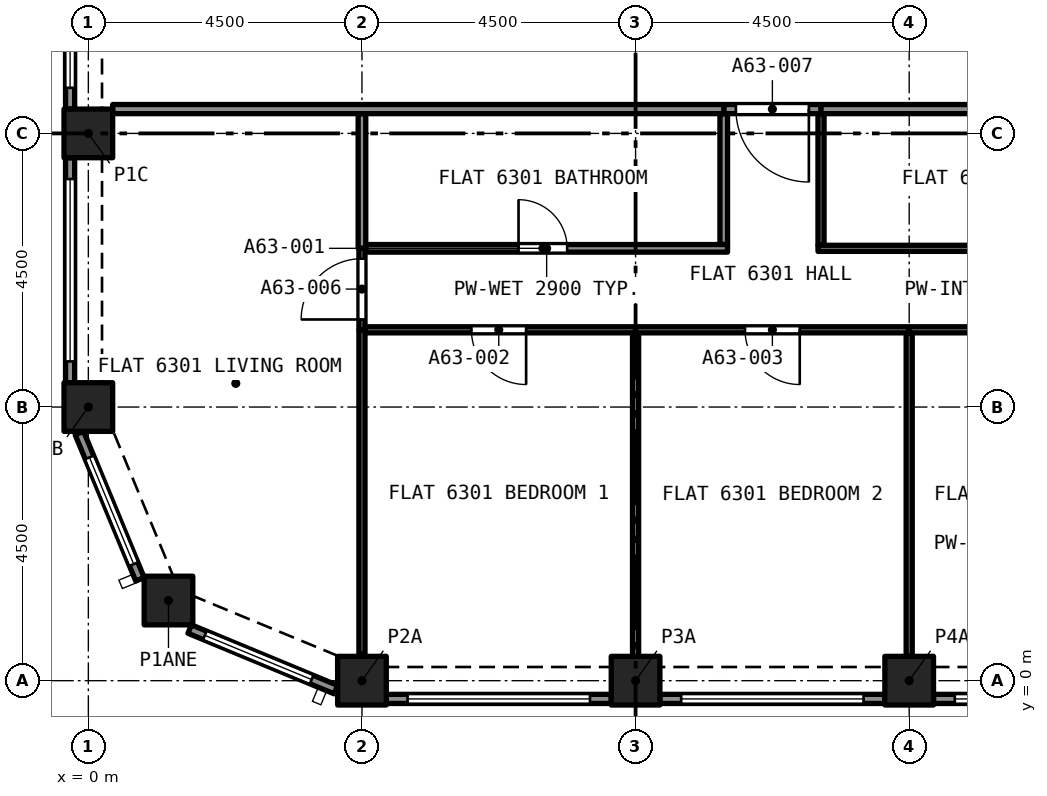
"""IFC4 building model, lengths in metres.
Left out: names, types, materials, properties, quantities, classifications, styles, units other than length and angle.
Written with IfcOpenShell. Run it as: python <this file> out.ifc"""

import sys

from ifc_helpers import new_model, si_unit, direction, frame, frame_2d, origin, origin_2d, place, context, subcontext, project, spatial, rectangle, extrude, element, fill, save


model = new_model("IFC4")
c1 = context("Model", 3, precision=1e-05, world=origin(), true_north=direction((0.0, 1.0)))
c2 = subcontext(c1, "Body", "Model", "MODEL_VIEW")
j1 = project(units=[si_unit("LENGTHUNIT", "METRE"), si_unit("PLANEANGLEUNIT", "RADIAN")], contexts=[c1])
p1 = place(None, origin())
s1 = spatial("IfcSite", under=j1, at=p1, CompositionType="ELEMENT")
p2 = place(p1, origin())
s2 = spatial("IfcBuilding", under=s1, at=p2, CompositionType="ELEMENT")
p3 = place(p2, frame((0.0, 0.0, 226.095)))
s3 = spatial("IfcBuildingStorey", under=s2, at=p3, CompositionType="ELEMENT", Elevation=226.095)
for number, where, z_axis, x_axis in (
    (1, (4.5, 0.0, 0.0), (0.0, 0.0, 1.0), (1.0, 0.0, 0.0)),
    (2, (9.0, 0.0, 0.0), (0.0, 0.0, 1.0), (1.0, 0.0, 0.0)),
    (3, (13.5, 0.0, 0.0), (0.0, 0.0, 1.0), (1.0, 0.0, 0.0)),
    (4, (1.318, 1.318, 0.0), (0.0, 0.0, 1.0), (1.0, 0.0, 0.0)),
    (5, (0.0, 4.5, 0.0), (0.0, 0.0, 1.0), (1.0, 0.0, 0.0)),
    (6, (0.0, 9.0, 0.0), (0.0, 0.0, 1.0), (1.0, 0.0, 0.0)),
):
    element("IfcColumn", number, at=place(p3, frame(where, z_axis=z_axis, x_axis=x_axis)), inside=s3, PredefinedType="COLUMN", context=c2, shape_type="SweptSolid", body=[
        extrude(rectangle(XDim=0.8, YDim=0.8, at=origin_2d()), origin(), (0.0, 0.0, 1.0), 3.2),
    ])
p4 = place(p3, frame((-0.3, 9.4, 0.0), z_axis=(0.0, 0.0, 1.0), x_axis=(0.0, 1.0, 0.0)))
e7 = element("IfcWall", 7, at=p4, inside=s3, PredefinedType="SOLIDWALL", context=c2, shape_type="SweptSolid", body=[
    extrude(rectangle(XDim=3.7, YDim=0.15, at=frame_2d((1.85, 0.0))), origin(), (0.0, 0.0, 1.0), 3.2),
])
p5 = place(p4, frame((0.35, 0.0, 0.45)))
e8 = element("IfcOpeningElement", 8, at=p5, cuts=e7, PredefinedType="OPENING", context=c2, shape_type="SweptSolid", body=[
    extrude(rectangle(XDim=3.0, YDim=1.95, at=frame_2d((1.5, 0.975))), frame((0.0, 0.085, 0.0), z_axis=(0.0, -1.0, 0.0), x_axis=(1.0, 0.0, 0.0)), (0.0, 0.0, 1.0), 0.17),
])
p6 = place(p3, frame((-0.3, 4.9, 0.0), z_axis=(0.0, 0.0, 1.0), x_axis=(0.0, 1.0, 0.0)))
e9 = element("IfcWall", 9, at=p6, inside=s3, PredefinedType="SOLIDWALL", context=c2, shape_type="SweptSolid", body=[
    extrude(rectangle(XDim=3.7, YDim=0.15, at=frame_2d((1.85, 0.0))), origin(), (0.0, 0.0, 1.0), 3.2),
])
p7 = place(p6, frame((0.35, 0.0, 0.45)))
e10 = element("IfcOpeningElement", 10, at=p7, cuts=e9, PredefinedType="OPENING", context=c2, shape_type="SweptSolid", body=[
    extrude(rectangle(XDim=3.0, YDim=1.95, at=frame_2d((1.5, 0.975))), frame((0.0, 0.085, 0.0), z_axis=(0.0, -1.0, 0.0), x_axis=(1.0, 0.0, 0.0)), (0.0, 0.0, 1.0), 0.17),
])
p8 = place(p3, frame((0.849, 1.667, 0.0), z_axis=(0.0, 0.0, 1.0), x_axis=(-0.382669406082, 0.923885342263, 0.0)))
e11 = element("IfcWall", 11, at=p8, inside=s3, PredefinedType="SOLIDWALL", context=c2, shape_type="SweptSolid", body=[
    extrude(rectangle(XDim=2.602, YDim=0.15, at=frame_2d((1.301, 0.0))), origin(), (0.0, 0.0, 1.0), 3.2),
])
p9 = place(p8, frame((0.27, 0.0, 0.45)))
e12 = element("IfcOpeningElement", 12, at=p9, cuts=e11, PredefinedType="OPENING", context=c2, shape_type="SweptSolid", body=[
    extrude(rectangle(XDim=1.9, YDim=1.95, at=frame_2d((0.95, 0.975))), frame((0.0, 0.085, 0.0), z_axis=(0.0, -1.0, 0.0), x_axis=(1.0, 0.0, 0.0)), (0.0, 0.0, 1.0), 0.17),
])
p10 = place(p3, frame((4.071, -0.147, 0.0), z_axis=(0.0, 0.0, 1.0), x_axis=(-0.923885342263, 0.382669406082, 0.0)))
e13 = element("IfcWall", 13, at=p10, inside=s3, PredefinedType="SOLIDWALL", context=c2, shape_type="SweptSolid", body=[
    extrude(rectangle(XDim=2.602, YDim=0.15, at=frame_2d((1.301, 0.0))), origin(), (0.0, 0.0, 1.0), 3.2),
])
p11 = place(p10, frame((0.432, 0.0, 0.45)))
e14 = element("IfcOpeningElement", 14, at=p11, cuts=e13, PredefinedType="OPENING", context=c2, shape_type="SweptSolid", body=[
    extrude(rectangle(XDim=1.9, YDim=1.95, at=frame_2d((0.95, 0.975))), frame((0.0, 0.085, 0.0), z_axis=(0.0, -1.0, 0.0), x_axis=(1.0, 0.0, 0.0)), (0.0, 0.0, 1.0), 0.17),
])
p12 = place(p3, frame((8.6, -0.3, 0.0), z_axis=(0.0, 0.0, 1.0), x_axis=(-1.0, 0.0, 0.0)))
e15 = element("IfcWall", 15, at=p12, inside=s3, PredefinedType="SOLIDWALL", context=c2, shape_type="SweptSolid", body=[
    extrude(rectangle(XDim=3.7, YDim=0.15, at=frame_2d((1.85, 0.0))), origin(), (0.0, 0.0, 1.0), 3.2),
])
p13 = place(p12, frame((0.35, 0.0, 0.45)))
e16 = element("IfcOpeningElement", 16, at=p13, cuts=e15, PredefinedType="OPENING", context=c2, shape_type="SweptSolid", body=[
    extrude(rectangle(XDim=3.0, YDim=1.95, at=frame_2d((1.5, 0.975))), frame((0.0, 0.085, 0.0), z_axis=(0.0, -1.0, 0.0), x_axis=(1.0, 0.0, 0.0)), (0.0, 0.0, 1.0), 0.17),
])
p14 = place(p3, frame((13.1, -0.3, 0.0), z_axis=(0.0, 0.0, 1.0), x_axis=(-1.0, 0.0, 0.0)))
e17 = element("IfcWall", 17, at=p14, inside=s3, PredefinedType="SOLIDWALL", context=c2, shape_type="SweptSolid", body=[
    extrude(rectangle(XDim=3.7, YDim=0.15, at=frame_2d((1.85, 0.0))), origin(), (0.0, 0.0, 1.0), 3.2),
])
p15 = place(p14, frame((0.35, 0.0, 0.45)))
e18 = element("IfcOpeningElement", 18, at=p15, cuts=e17, PredefinedType="OPENING", context=c2, shape_type="SweptSolid", body=[
    extrude(rectangle(XDim=3.0, YDim=1.95, at=frame_2d((1.5, 0.975))), frame((0.0, 0.085, 0.0), z_axis=(0.0, -1.0, 0.0), x_axis=(1.0, 0.0, 0.0)), (0.0, 0.0, 1.0), 0.17),
])
p16 = place(p3, frame((17.6, -0.3, 0.0), z_axis=(0.0, 0.0, 1.0), x_axis=(-1.0, 0.0, 0.0)))
e19 = element("IfcWall", 19, at=p16, inside=s3, PredefinedType="SOLIDWALL", context=c2, shape_type="SweptSolid", body=[
    extrude(rectangle(XDim=3.7, YDim=0.15, at=frame_2d((1.85, 0.0))), origin(), (0.0, 0.0, 1.0), 3.2),
])
p17 = place(p16, frame((0.35, 0.0, 0.45)))
e20 = element("IfcOpeningElement", 20, at=p17, cuts=e19, PredefinedType="OPENING", context=c2, shape_type="SweptSolid", body=[
    extrude(rectangle(XDim=3.0, YDim=1.95, at=frame_2d((1.5, 0.975))), frame((0.0, 0.085, 0.0), z_axis=(0.0, -1.0, 0.0), x_axis=(1.0, 0.0, 0.0)), (0.0, 0.0, 1.0), 0.17),
])
p18 = place(p3, frame((10.45, 7.173, 0.0), z_axis=(0.0, 0.0, 1.0), x_axis=(0.0, 1.0, 0.0)))
e21 = element("IfcWall", 21, at=p18, inside=s3, PredefinedType="PARTITIONING", context=c2, shape_type="SweptSolid", body=[
    extrude(rectangle(XDim=2.152, YDim=0.125, at=frame_2d((1.076, 0.0))), origin(), (0.0, 0.0, 1.0), 2.9),
])
p19 = place(p3, frame((4.562, 7.11, 0.0), z_axis=(0.0, 0.0, 1.0), x_axis=(1.0, 0.0, 0.0)))
e22 = element("IfcWall", 22, at=p19, inside=s3, PredefinedType="PARTITIONING", context=c2, shape_type="SweptSolid", body=[
    extrude(rectangle(XDim=5.95, YDim=0.125, at=frame_2d((2.975, 0.0))), origin(), (0.0, 0.0, 1.0), 2.9),
])
p20 = place(p19, frame((2.512, 0.0, 0.0)))
e23 = element("IfcOpeningElement", 23, at=p20, cuts=e22, PredefinedType="OPENING", context=c2, shape_type="SweptSolid", body=[
    extrude(rectangle(XDim=0.8, YDim=2.1, at=frame_2d((0.4, 1.05))), frame((0.0, 0.073, 0.0), z_axis=(0.0, -1.0, 0.0), x_axis=(1.0, 0.0, 0.0)), (0.0, 0.0, 1.0), 0.145),
])
p21 = place(p3, frame((4.5, 7.11, 0.0), z_axis=(0.0, 0.0, 1.0), x_axis=(0.0, 1.0, 0.0)))
e24 = element("IfcWall", 24, at=p21, inside=s3, PredefinedType="PARTITIONING", context=c2, shape_type="SweptSolid", body=[
    extrude(rectangle(XDim=2.215, YDim=0.125, at=frame_2d((1.107, 0.0))), origin(), (0.0, 0.0, 1.0), 2.9),
])
p22 = place(p3, frame((9.0, 0.4, 0.0), z_axis=(0.0, 0.0, 1.0), x_axis=(0.0, 1.0, 0.0)))
e25 = element("IfcWall", 25, at=p22, inside=s3, PredefinedType="PARTITIONING", context=c2, shape_type="SweptSolid", body=[
    extrude(rectangle(XDim=5.32, YDim=0.1, at=frame_2d((2.66, 0.0))), origin(), (0.0, 0.0, 1.0), 2.9),
])
p23 = place(p3, frame((9.0, 5.77, 0.0), z_axis=(0.0, 0.0, 1.0), x_axis=(-1.0, 0.0, 0.0)))
e26 = element("IfcWall", 26, at=p23, inside=s3, PredefinedType="PARTITIONING", context=c2, shape_type="SweptSolid", body=[
    extrude(rectangle(XDim=4.45, YDim=0.1, at=frame_2d((2.225, 0.0))), origin(), (0.0, 0.0, 1.0), 2.9),
])
p24 = place(p23, frame((1.8, 0.0, 0.0)))
e27 = element("IfcOpeningElement", 27, at=p24, cuts=e26, PredefinedType="OPENING", context=c2, shape_type="SweptSolid", body=[
    extrude(rectangle(XDim=0.9, YDim=2.1, at=frame_2d((0.45, 1.05))), frame((0.0, 0.06, 0.0), z_axis=(0.0, -1.0, 0.0), x_axis=(1.0, 0.0, 0.0)), (0.0, 0.0, 1.0), 0.12),
])
p25 = place(p3, frame((4.5, 0.433, 0.0), z_axis=(0.0, 0.0, 1.0), x_axis=(0.0, 1.0, 0.0)))
e28 = element("IfcWall", 28, at=p25, inside=s3, PredefinedType="PARTITIONING", context=c2, shape_type="SweptSolid", body=[
    extrude(rectangle(XDim=5.337, YDim=0.1, at=frame_2d((2.668, 0.0))), origin(), (0.0, 0.0, 1.0), 2.9),
])
p26 = place(p3, frame((13.5, 0.4, 0.0), z_axis=(0.0, 0.0, 1.0), x_axis=(0.0, 1.0, 0.0)))
e29 = element("IfcWall", 29, at=p26, inside=s3, PredefinedType="PARTITIONING", context=c2, shape_type="SweptSolid", body=[
    extrude(rectangle(XDim=5.32, YDim=0.1, at=frame_2d((2.66, 0.0))), origin(), (0.0, 0.0, 1.0), 2.9),
])
p27 = place(p3, frame((13.5, 5.77, 0.0), z_axis=(0.0, 0.0, 1.0), x_axis=(-1.0, 0.0, 0.0)))
e30 = element("IfcWall", 30, at=p27, inside=s3, PredefinedType="PARTITIONING", context=c2, shape_type="SweptSolid", body=[
    extrude(rectangle(XDim=4.5, YDim=0.1, at=frame_2d((2.25, 0.0))), origin(), (0.0, 0.0, 1.0), 2.9),
])
p28 = place(p27, frame((1.8, 0.0, 0.0)))
e31 = element("IfcOpeningElement", 31, at=p28, cuts=e30, PredefinedType="OPENING", context=c2, shape_type="SweptSolid", body=[
    extrude(rectangle(XDim=0.9, YDim=2.1, at=frame_2d((0.45, 1.05))), frame((0.0, 0.06, 0.0), z_axis=(0.0, -1.0, 0.0), x_axis=(1.0, 0.0, 0.0)), (0.0, 0.0, 1.0), 0.12),
])
p29 = place(p3, frame((17.9, 5.77, 0.0), z_axis=(0.0, 0.0, 1.0), x_axis=(-1.0, 0.0, 0.0)))
e32 = element("IfcWall", 32, at=p29, inside=s3, PredefinedType="PARTITIONING", context=c2, shape_type="SweptSolid", body=[
    extrude(rectangle(XDim=4.4, YDim=0.1, at=frame_2d((2.2, 0.0))), origin(), (0.0, 0.0, 1.0), 2.9),
])
p30 = place(p29, frame((1.7, 0.0, 0.0)))
e33 = element("IfcOpeningElement", 33, at=p30, cuts=e32, PredefinedType="OPENING", context=c2, shape_type="SweptSolid", body=[
    extrude(rectangle(XDim=0.9, YDim=2.1, at=frame_2d((0.45, 1.05))), frame((0.0, 0.06, 0.0), z_axis=(0.0, -1.0, 0.0), x_axis=(1.0, 0.0, 0.0)), (0.0, 0.0, 1.0), 0.12),
])
p31 = place(p3, frame((12.05, 7.16, 0.0), z_axis=(0.0, 0.0, 1.0), x_axis=(0.0, 1.0, 0.0)))
e34 = element("IfcWall", 34, at=p31, inside=s3, PredefinedType="PARTITIONING", context=c2, shape_type="SweptSolid", body=[
    extrude(rectangle(XDim=2.165, YDim=0.1, at=frame_2d((1.083, 0.0))), origin(), (0.0, 0.0, 1.0), 2.9),
])
p32 = place(p3, frame((12.0, 7.11, 0.0), z_axis=(0.0, 0.0, 1.0), x_axis=(1.0, 0.0, 0.0)))
e35 = element("IfcWall", 35, at=p32, inside=s3, PredefinedType="PARTITIONING", context=c2, shape_type="SweptSolid", body=[
    extrude(rectangle(XDim=5.9, YDim=0.1, at=frame_2d((2.95, 0.0))), origin(), (0.0, 0.0, 1.0), 2.9),
])
p33 = place(p32, frame((2.575, 0.0, 0.0)))
e36 = element("IfcOpeningElement", 36, at=p33, cuts=e35, PredefinedType="OPENING", context=c2, shape_type="SweptSolid", body=[
    extrude(rectangle(XDim=0.9, YDim=2.1, at=frame_2d((0.45, 1.05))), frame((0.0, 0.06, 0.0), z_axis=(0.0, -1.0, 0.0), x_axis=(1.0, 0.0, 0.0)), (0.0, 0.0, 1.0), 0.12),
])
p34 = place(p3, frame((4.5, 5.77, 0.0), z_axis=(0.0, 0.0, 1.0), x_axis=(0.0, 1.0, 0.0)))
e37 = element("IfcWall", 37, at=p34, inside=s3, PredefinedType="PARTITIONING", context=c2, shape_type="SweptSolid", body=[
    extrude(rectangle(XDim=1.34, YDim=0.1, at=frame_2d((0.67, 0.0))), origin(), (0.0, 0.0, 1.0), 2.9),
])
p35 = place(p34, frame((0.17, 0.0, 0.0)))
e38 = element("IfcOpeningElement", 38, at=p35, cuts=e37, PredefinedType="OPENING", context=c2, shape_type="SweptSolid", body=[
    extrude(rectangle(XDim=1.0, YDim=2.1, at=frame_2d((0.5, 1.05))), frame((0.0, 0.06, 0.0), z_axis=(0.0, -1.0, 0.0), x_axis=(1.0, 0.0, 0.0)), (0.0, 0.0, 1.0), 0.12),
])
p36 = place(p3, frame((12.05, 9.4, 0.0), z_axis=(0.0, 0.0, 1.0), x_axis=(-1.0, 0.0, 0.0)))
e39 = element("IfcWall", 39, at=p36, inside=s3, PredefinedType="PARTITIONING", context=c2, shape_type="SweptSolid", body=[
    extrude(rectangle(XDim=1.6, YDim=0.15, at=frame_2d((0.8, 0.0))), origin(), (0.0, 0.0, 1.0), 2.9),
])
p37 = place(p36, frame((0.2, 0.0, 0.0)))
e40 = element("IfcOpeningElement", 40, at=p37, cuts=e39, PredefinedType="OPENING", context=c2, shape_type="SweptSolid", body=[
    extrude(rectangle(XDim=1.2, YDim=2.4, at=frame_2d((0.6, 1.2))), frame((0.0, 0.085, 0.0), z_axis=(0.0, -1.0, 0.0), x_axis=(1.0, 0.0, 0.0)), (0.0, 0.0, 1.0), 0.17),
])
p38 = place(p3, frame((12.05, 9.4, 0.0), z_axis=(0.0, 0.0, 1.0), x_axis=(1.0, 0.0, 0.0)))
e41 = element("IfcWall", 41, at=p38, inside=s3, PredefinedType="PARTITIONING", context=c2, shape_type="SweptSolid", body=[
    extrude(rectangle(XDim=5.55, YDim=0.15, at=frame_2d((2.775, 0.0))), origin(), (0.0, 0.0, 1.0), 2.9),
])
p39 = place(p3, frame((0.4, 9.4, 0.0), z_axis=(0.0, 0.0, 1.0), x_axis=(1.0, 0.0, 0.0)))
e42 = element("IfcWall", 42, at=p39, inside=s3, PredefinedType="PARTITIONING", context=c2, shape_type="SweptSolid", body=[
    extrude(rectangle(XDim=10.05, YDim=0.15, at=frame_2d((5.025, 0.0))), origin(), (0.0, 0.0, 1.0), 2.9),
])
p40 = place(p5, origin())
e43 = element("IfcWindow", 43, at=p40, inside=s3, PartitioningType="SINGLE_PANEL", PredefinedType="WINDOW", context=c2, shape_type="SweptSolid", body=[
    extrude(rectangle(XDim=3.0, YDim=1.95, at=frame_2d((1.5, 0.975))), frame((0.0, 0.03, 0.0), z_axis=(0.0, -1.0, 0.0), x_axis=(1.0, 0.0, 0.0)), (0.0, 0.0, 1.0), 0.06),
])
fill(e8, e43)
p41 = place(p7, origin())
e44 = element("IfcWindow", 44, at=p41, inside=s3, PartitioningType="SINGLE_PANEL", PredefinedType="WINDOW", context=c2, shape_type="SweptSolid", body=[
    extrude(rectangle(XDim=3.0, YDim=1.95, at=frame_2d((1.5, 0.975))), frame((0.0, 0.03, 0.0), z_axis=(0.0, -1.0, 0.0), x_axis=(1.0, 0.0, 0.0)), (0.0, 0.0, 1.0), 0.06),
])
fill(e10, e44)
p42 = place(p9, origin())
e45 = element("IfcWindow", 45, at=p42, inside=s3, PartitioningType="SINGLE_PANEL", PredefinedType="WINDOW", context=c2, shape_type="SweptSolid", body=[
    extrude(rectangle(XDim=1.9, YDim=1.95, at=frame_2d((0.95, 0.975))), frame((0.0, 0.03, 0.0), z_axis=(0.0, -1.0, 0.0), x_axis=(1.0, 0.0, 0.0)), (0.0, 0.0, 1.0), 0.06),
])
fill(e12, e45)
p43 = place(p11, origin())
e46 = element("IfcWindow", 46, at=p43, inside=s3, PartitioningType="SINGLE_PANEL", PredefinedType="WINDOW", context=c2, shape_type="SweptSolid", body=[
    extrude(rectangle(XDim=1.9, YDim=1.95, at=frame_2d((0.95, 0.975))), frame((0.0, 0.03, 0.0), z_axis=(0.0, -1.0, 0.0), x_axis=(1.0, 0.0, 0.0)), (0.0, 0.0, 1.0), 0.06),
])
fill(e14, e46)
p44 = place(p13, origin())
e47 = element("IfcWindow", 47, at=p44, inside=s3, PartitioningType="SINGLE_PANEL", PredefinedType="WINDOW", context=c2, shape_type="SweptSolid", body=[
    extrude(rectangle(XDim=3.0, YDim=1.95, at=frame_2d((1.5, 0.975))), frame((0.0, 0.03, 0.0), z_axis=(0.0, -1.0, 0.0), x_axis=(1.0, 0.0, 0.0)), (0.0, 0.0, 1.0), 0.06),
])
fill(e16, e47)
p45 = place(p15, origin())
e48 = element("IfcWindow", 48, at=p45, inside=s3, PartitioningType="SINGLE_PANEL", PredefinedType="WINDOW", context=c2, shape_type="SweptSolid", body=[
    extrude(rectangle(XDim=3.0, YDim=1.95, at=frame_2d((1.5, 0.975))), frame((0.0, 0.03, 0.0), z_axis=(0.0, -1.0, 0.0), x_axis=(1.0, 0.0, 0.0)), (0.0, 0.0, 1.0), 0.06),
])
fill(e18, e48)
p46 = place(p17, origin())
e49 = element("IfcWindow", 49, at=p46, inside=s3, PartitioningType="SINGLE_PANEL", PredefinedType="WINDOW", context=c2, shape_type="SweptSolid", body=[
    extrude(rectangle(XDim=3.0, YDim=1.95, at=frame_2d((1.5, 0.975))), frame((0.0, 0.03, 0.0), z_axis=(0.0, -1.0, 0.0), x_axis=(1.0, 0.0, 0.0)), (0.0, 0.0, 1.0), 0.06),
])
fill(e20, e49)
p47 = place(p20, origin())
e50 = element("IfcDoor", 50, at=p47, inside=s3, OperationType="SINGLE_SWING_LEFT", PredefinedType="DOOR", context=c2, shape_type="SweptSolid", body=[
    extrude(rectangle(XDim=0.8, YDim=2.1, at=frame_2d((0.4, 1.05))), frame((0.0, 0.025, 0.0), z_axis=(0.0, -1.0, 0.0), x_axis=(1.0, 0.0, 0.0)), (0.0, 0.0, 1.0), 0.05),
])
fill(e23, e50)
p48 = place(p24, origin())
e51 = element("IfcDoor", 51, at=p48, inside=s3, OperationType="SINGLE_SWING_RIGHT", PredefinedType="DOOR", context=c2, shape_type="SweptSolid", body=[
    extrude(rectangle(XDim=0.9, YDim=2.1, at=frame_2d((0.45, 1.05))), frame((0.0, 0.025, 0.0), z_axis=(0.0, -1.0, 0.0), x_axis=(1.0, 0.0, 0.0)), (0.0, 0.0, 1.0), 0.05),
])
fill(e27, e51)
p49 = place(p28, origin())
e52 = element("IfcDoor", 52, at=p49, inside=s3, OperationType="SINGLE_SWING_LEFT", PredefinedType="DOOR", context=c2, shape_type="SweptSolid", body=[
    extrude(rectangle(XDim=0.9, YDim=2.1, at=frame_2d((0.45, 1.05))), frame((0.0, 0.025, 0.0), z_axis=(0.0, -1.0, 0.0), x_axis=(1.0, 0.0, 0.0)), (0.0, 0.0, 1.0), 0.05),
])
fill(e31, e52)
p50 = place(p35, origin())
e53 = element("IfcDoor", 53, at=p50, inside=s3, OperationType="SINGLE_SWING_RIGHT", PredefinedType="DOOR", context=c2, shape_type="SweptSolid", body=[
    extrude(rectangle(XDim=1.0, YDim=2.1, at=frame_2d((0.5, 1.05))), frame((0.0, 0.025, 0.0), z_axis=(0.0, -1.0, 0.0), x_axis=(1.0, 0.0, 0.0)), (0.0, 0.0, 1.0), 0.05),
])
fill(e38, e53)
p51 = place(p37, origin())
e54 = element("IfcDoor", 54, at=p51, inside=s3, OperationType="SINGLE_SWING_LEFT", PredefinedType="DOOR", context=c2, shape_type="SweptSolid", body=[
    extrude(rectangle(XDim=1.2, YDim=2.4, at=frame_2d((0.6, 1.2))), frame((0.0, 0.025, 0.0), z_axis=(0.0, -1.0, 0.0), x_axis=(1.0, 0.0, 0.0)), (0.0, 0.0, 1.0), 0.05),
])
fill(e40, e54)
save(model, sys.argv[1])
